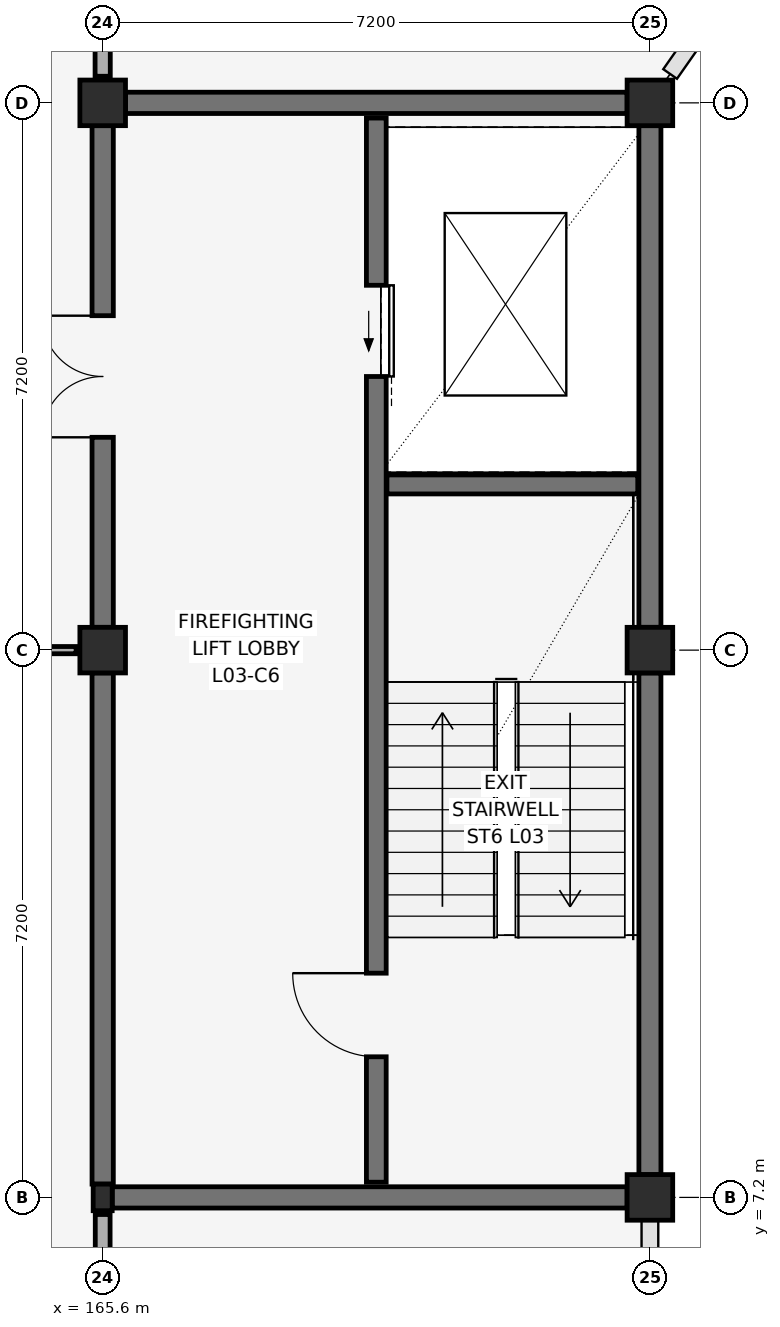
"""IFC4 building model, lengths in metres.
Left out: names, types, materials, properties, quantities, classifications, styles, units other than length and angle.
Written with IfcOpenShell. Run it as: python <this file> out.ifc"""

import sys

from ifc_helpers import new_model, si_unit, direction, frame, frame_2d, origin, origin_2d, place, context, subcontext, project, spatial, rectangle, hollow_rectangle, extrude, element, fill, save


model = new_model("IFC4")
c1 = context("Model", 3, precision=1e-05, world=origin(), true_north=direction((0.0, 1.0)))
c2 = subcontext(c1, "Body", "Model", "MODEL_VIEW")
j1 = project(units=[si_unit("LENGTHUNIT", "METRE"), si_unit("PLANEANGLEUNIT", "RADIAN")], contexts=[c1])
p1 = place(None, origin())
s1 = spatial("IfcSite", under=j1, at=p1, CompositionType="ELEMENT")
p2 = place(p1, origin())
s2 = spatial("IfcBuilding", under=s1, at=p2, CompositionType="ELEMENT")
p3 = place(p2, frame((0.0, 0.0, 15.0)))
s3 = spatial("IfcBuildingStorey", under=s2, at=p3, CompositionType="ELEMENT", Elevation=15.0)
p4 = place(p3, frame((165.6, 7.2, 0.0), z_axis=(0.0, 0.0, 1.0), x_axis=(1.0, 0.0, 0.0)))
e1 = element("IfcColumn", 1, at=p4, inside=s3, PredefinedType="COLUMN", context=c2, shape_type="SweptSolid", body=[
    extrude(hollow_rectangle(XDim=0.25, YDim=0.35, WallThickness=0.012, at=origin_2d()), origin(), (0.0, 0.0, 1.0), 4.2),
])
for number, where, z_axis, x_axis in (
    (2, (165.6, 14.4, 0.0), (0.0, 0.0, 1.0), (1.0, 0.0, 0.0)),
    (3, (165.6, 21.6, 0.0), (0.0, 0.0, 1.0), (1.0, 0.0, 0.0)),
    (4, (172.8, 7.2, 0.0), (0.0, 0.0, 1.0), (1.0, 0.0, 0.0)),
    (5, (172.8, 14.4, 0.0), (0.0, 0.0, 1.0), (1.0, 0.0, 0.0)),
    (6, (172.8, 21.6, 0.0), (0.0, 0.0, 1.0), (1.0, 0.0, 0.0)),
):
    element("IfcColumn", number, at=place(p3, frame(where, z_axis=z_axis, x_axis=x_axis)), inside=s3, PredefinedType="COLUMN", context=c2, shape_type="SweptSolid", body=[
        extrude(rectangle(XDim=0.6, YDim=0.6, at=origin_2d()), origin(), (0.0, 0.0, 1.0), 4.2),
    ])
p5 = place(p3, frame((165.725, 7.2, 0.0), z_axis=(0.0, 0.0, 1.0), x_axis=(1.0, 0.0, 0.0)))
e7 = element("IfcWall", 7, at=p5, inside=s3, PredefinedType="SHEAR", context=c2, shape_type="SweptSolid", body=[
    extrude(rectangle(XDim=6.775, YDim=0.28, at=frame_2d((3.387, 0.0))), origin(), (0.0, 0.0, 1.0), 3.96),
])
p6 = place(p3, frame((165.9, 21.6, 0.0), z_axis=(0.0, 0.0, 1.0), x_axis=(1.0, 0.0, 0.0)))
e8 = element("IfcWall", 8, at=p6, inside=s3, PredefinedType="SHEAR", context=c2, shape_type="SweptSolid", body=[
    extrude(rectangle(XDim=6.6, YDim=0.28, at=frame_2d((3.3, 0.0))), origin(), (0.0, 0.0, 1.0), 3.96),
])
p7 = place(p3, frame((165.6, 7.375, 0.0), z_axis=(0.0, 0.0, 1.0), x_axis=(0.0, 1.0, 0.0)))
e9 = element("IfcWall", 9, at=p7, inside=s3, PredefinedType="SHEAR", context=c2, shape_type="SweptSolid", body=[
    extrude(rectangle(XDim=6.725, YDim=0.28, at=frame_2d((3.363, 0.0))), origin(), (0.0, 0.0, 1.0), 3.96),
])
p8 = place(p3, frame((165.6, 14.7, 0.0), z_axis=(0.0, 0.0, 1.0), x_axis=(0.0, 1.0, 0.0)))
e10 = element("IfcWall", 10, at=p8, inside=s3, PredefinedType="SHEAR", context=c2, shape_type="SweptSolid", body=[
    extrude(rectangle(XDim=6.6, YDim=0.28, at=frame_2d((3.3, 0.0))), origin(), (0.0, 0.0, 1.0), 3.96),
])
p9 = place(p8, frame((2.5, 0.0, 0.0)))
e11 = element("IfcOpeningElement", 11, at=p9, cuts=e10, PredefinedType="OPENING", context=c2, shape_type="SweptSolid", body=[
    extrude(rectangle(XDim=1.6, YDim=2.2, at=frame_2d((0.8, 1.1))), frame((0.0, 0.155, 0.0), z_axis=(0.0, -1.0, 0.0), x_axis=(1.0, 0.0, 0.0)), (0.0, 0.0, 1.0), 0.31),
])
for number, where, z_axis, x_axis in (
    (12, (172.8, 7.5, 0.0), (0.0, 0.0, 1.0), (0.0, 1.0, 0.0)),
    (13, (172.8, 14.7, 0.0), (0.0, 0.0, 1.0), (0.0, 1.0, 0.0)),
):
    element("IfcWall", number, at=place(p3, frame(where, z_axis=z_axis, x_axis=x_axis)), inside=s3, PredefinedType="SHEAR", context=c2, shape_type="SweptSolid", body=[
        extrude(rectangle(XDim=6.6, YDim=0.29, at=frame_2d((3.3, 0.0))), origin(), (0.0, 0.0, 1.0), 3.96),
    ])
p10 = place(p3, frame((169.2, 7.4, 0.0), z_axis=(0.0, 0.0, 1.0), x_axis=(0.0, 1.0, 0.0)))
e14 = element("IfcWall", 14, at=p10, inside=s3, PredefinedType="SHEAR", context=c2, shape_type="SweptSolid", body=[
    extrude(rectangle(XDim=14.0, YDim=0.26, at=frame_2d((7.0, 0.0))), origin(), (0.0, 0.0, 1.0), 3.96),
])
p11 = place(p10, frame((1.65, 0.0, 0.0)))
e15 = element("IfcOpeningElement", 15, at=p11, cuts=e14, PredefinedType="OPENING", context=c2, shape_type="SweptSolid", body=[
    extrude(rectangle(XDim=1.1, YDim=2.15, at=frame_2d((0.55, 1.075))), frame((0.0, 0.145, 0.0), z_axis=(0.0, -1.0, 0.0), x_axis=(1.0, 0.0, 0.0)), (0.0, 0.0, 1.0), 0.29),
])
p12 = place(p10, frame((10.6, 0.0, 0.0)))
e16 = element("IfcOpeningElement", 16, at=p12, cuts=e14, PredefinedType="OPENING", context=c2, shape_type="SweptSolid", body=[
    extrude(rectangle(XDim=1.2, YDim=2.25, at=frame_2d((0.6, 1.125))), frame((0.0, 0.145, 0.0), z_axis=(0.0, -1.0, 0.0), x_axis=(1.0, 0.0, 0.0)), (0.0, 0.0, 1.0), 0.29),
])
p13 = place(p3, frame((169.34, 16.58, 0.0), z_axis=(0.0, 0.0, 1.0), x_axis=(1.0, 0.0, 0.0)))
e17 = element("IfcWall", 17, at=p13, inside=s3, PredefinedType="SHEAR", context=c2, shape_type="SweptSolid", body=[
    extrude(rectangle(XDim=3.3, YDim=0.25, at=frame_2d((1.65, 0.0))), origin(), (0.0, 0.0, 1.0), 3.96),
])
p14 = place(p3, frame((158.575, 14.4, 0.0), z_axis=(0.0, 0.0, 1.0), x_axis=(1.0, 0.0, 0.0)))
e18 = element("IfcWall", 18, at=p14, inside=s3, PredefinedType="PARTITIONING", context=c2, shape_type="SweptSolid", body=[
    extrude(rectangle(XDim=6.675, YDim=0.095, at=frame_2d((3.337, 0.0))), origin(), (0.0, 0.0, 1.0), 3.57),
])
p15 = place(p14, frame((1.938, 0.0, 0.95)))
e19 = element("IfcOpeningElement", 19, at=p15, cuts=e18, PredefinedType="OPENING", context=c2, shape_type="SweptSolid", body=[
    extrude(rectangle(XDim=2.8, YDim=1.35, at=frame_2d((1.4, 0.675))), frame((0.0, 0.062, 0.0), z_axis=(0.0, -1.0, 0.0), x_axis=(1.0, 0.0, 0.0)), (0.0, 0.0, 1.0), 0.125),
])
p16 = place(p3, frame((165.6, 0.35, 0.0), z_axis=(0.0, 0.0, 1.0), x_axis=(0.0, 1.0, 0.0)))
e20 = element("IfcWall", 20, at=p16, inside=s3, PredefinedType="PARTITIONING", context=c2, shape_type="SweptSolid", body=[
    extrude(rectangle(XDim=6.625, YDim=0.195, at=frame_2d((3.312, 0.0))), origin(), (0.0, 0.0, 1.0), 3.57),
])
p17 = place(p3, frame((165.6, 21.95, 0.0), z_axis=(0.0, 0.0, 1.0), x_axis=(0.0, 1.0, 0.0)))
e21 = element("IfcWall", 21, at=p17, inside=s3, PredefinedType="SOLIDWALL", context=c2, shape_type="SweptSolid", body=[
    extrude(rectangle(XDim=6.5, YDim=0.2, at=frame_2d((3.25, 0.0))), origin(), (0.0, 0.0, 1.0), 3.62),
])
p18 = place(p17, frame((2.75, 0.0, 0.0)))
e22 = element("IfcOpeningElement", 22, at=p18, cuts=e21, PredefinedType="OPENING", context=c2, shape_type="SweptSolid", body=[
    extrude(rectangle(XDim=1.0, YDim=2.1, at=frame_2d((0.5, 1.05))), frame((0.0, 0.115, 0.0), z_axis=(0.0, -1.0, 0.0), x_axis=(1.0, 0.0, 0.0)), (0.0, 0.0, 1.0), 0.23),
])
p19 = place(p11, frame((1.1, 0.0, 0.0), z_axis=(0.0, 0.0, 1.0), x_axis=(-1.0, 0.0, 0.0)))
e23 = element("IfcDoor", 23, at=p19, inside=s3, OperationType="SINGLE_SWING_LEFT", PredefinedType="DOOR", context=c2, shape_type="SweptSolid", body=[
    extrude(rectangle(XDim=1.1, YDim=2.15, at=frame_2d((0.55, 1.075))), frame((0.0, 0.025, 0.0), z_axis=(0.0, -1.0, 0.0), x_axis=(1.0, 0.0, 0.0)), (0.0, 0.0, 1.0), 0.05),
])
fill(e15, e23)
p20 = place(p12, origin())
e24 = element("IfcDoor", 24, at=p20, inside=s3, OperationType="SLIDING_TO_LEFT", PredefinedType="DOOR", context=c2, shape_type="SweptSolid", body=[
    extrude(rectangle(XDim=1.2, YDim=2.25, at=frame_2d((0.6, 1.125))), frame((0.0, 0.025, 0.0), z_axis=(0.0, -1.0, 0.0), x_axis=(1.0, 0.0, 0.0)), (0.0, 0.0, 1.0), 0.05),
])
fill(e16, e24)
p21 = place(p9, origin())
e25 = element("IfcDoor", 25, at=p21, inside=s3, OperationType="DOUBLE_SWING_LEFT", PredefinedType="DOOR", context=c2, shape_type="SweptSolid", body=[
    extrude(rectangle(XDim=1.6, YDim=2.2, at=frame_2d((0.8, 1.1))), frame((0.0, 0.025, 0.0), z_axis=(0.0, -1.0, 0.0), x_axis=(1.0, 0.0, 0.0)), (0.0, 0.0, 1.0), 0.05),
])
fill(e11, e25)
save(model, sys.argv[1])
